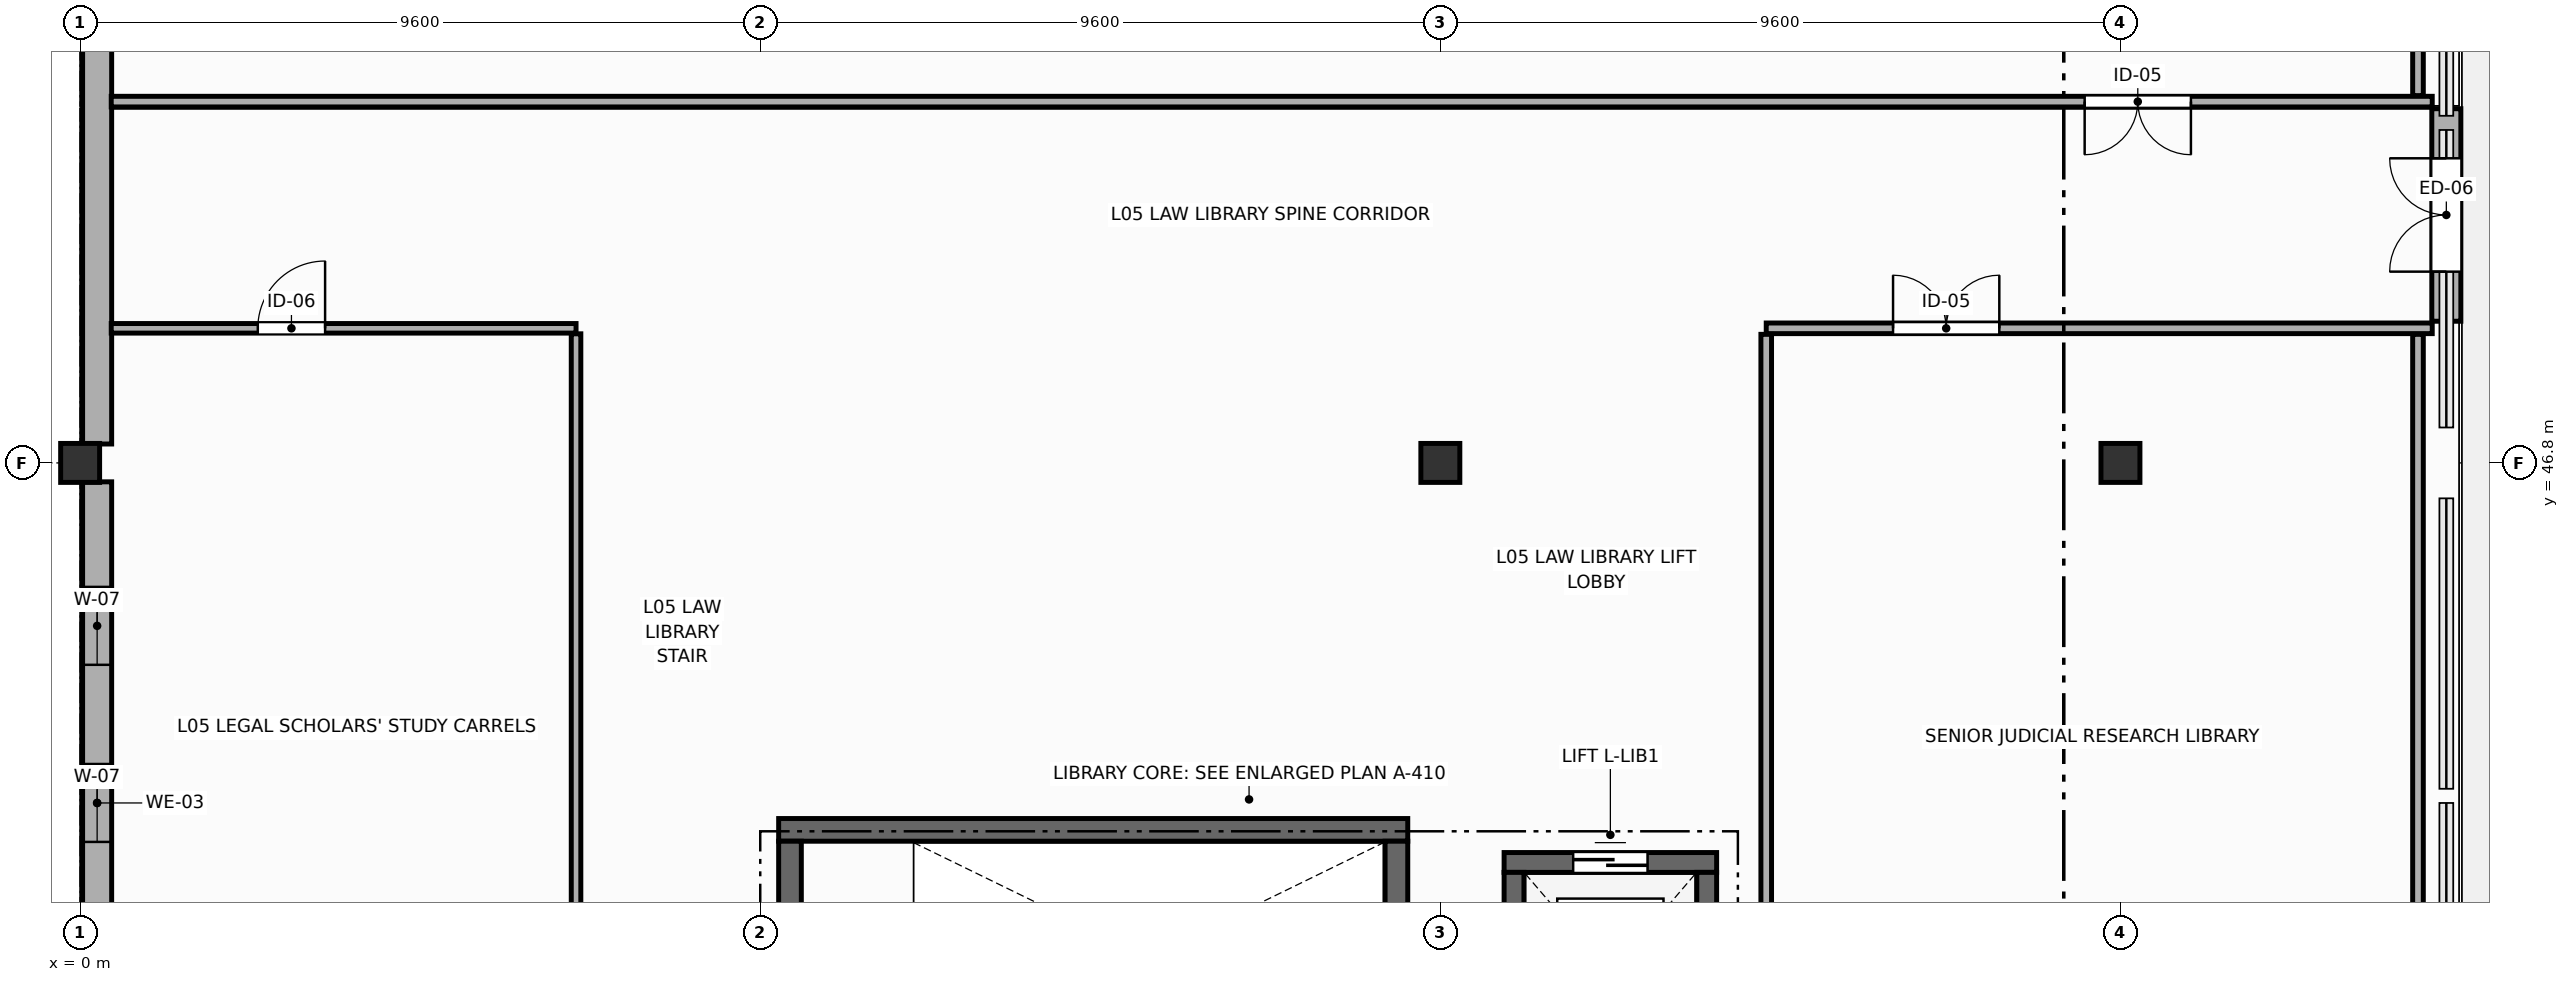
"""IFC4 building model, lengths in metres.
Left out: names, types, materials, properties, quantities, classifications, styles, units other than length and angle.
Written with IfcOpenShell. Run it as: python <this file> out.ifc"""

import sys

from ifc_helpers import new_model, si_unit, direction, frame, frame_2d, origin, origin_2d, place, context, subcontext, project, spatial, rectangle, extrude, element, fill, save


model = new_model("IFC4")
c1 = context("Model", 3, precision=1e-05, world=origin(), true_north=direction((0.0, 1.0)))
c2 = subcontext(c1, "Body", "Model", "MODEL_VIEW")
j1 = project(units=[si_unit("LENGTHUNIT", "METRE"), si_unit("PLANEANGLEUNIT", "RADIAN")], contexts=[c1])
p1 = place(None, origin())
s1 = spatial("IfcSite", under=j1, at=p1, CompositionType="ELEMENT")
p2 = place(p1, origin())
s2 = spatial("IfcBuilding", under=s1, at=p2, CompositionType="ELEMENT")
p3 = place(p2, frame((0.0, 0.0, 18.6)))
s3 = spatial("IfcBuildingStorey", under=s2, at=p3, CompositionType="ELEMENT", Elevation=18.6)
for number, where, z_axis, x_axis in (
    (1, (0.0, 46.8, 0.0), (0.0, 0.0, 1.0), (1.0, 0.0, 0.0)),
    (2, (19.2, 46.8, 0.0), (0.0, 0.0, 1.0), (1.0, 0.0, 0.0)),
    (3, (28.8, 46.8, 0.0), (0.0, 0.0, 1.0), (1.0, 0.0, 0.0)),
):
    element("IfcColumn", number, at=place(p3, frame(where, z_axis=z_axis, x_axis=x_axis)), inside=s3, PredefinedType="COLUMN", context=c2, shape_type="SweptSolid", body=[
        extrude(rectangle(XDim=0.55, YDim=0.55, at=origin_2d()), origin(), (0.0, 0.0, 1.0), 4.2),
    ])
p4 = place(p3, frame((0.24, 37.467, 0.0), z_axis=(0.0, 0.0, 1.0), x_axis=(0.0, 1.0, 0.0)))
e4 = element("IfcWall", 4, at=p4, inside=s3, PredefinedType="STANDARD", context=c2, shape_type="SweptSolid", body=[
    extrude(rectangle(XDim=9.066, YDim=0.41, at=frame_2d((4.533, 0.0))), origin(), (0.0, 0.0, 1.0), 3.14),
])
p5 = place(p4, frame((1.483, 0.0, 0.9)))
e5 = element("IfcOpeningElement", 5, at=p5, cuts=e4, PredefinedType="OPENING", context=c2, shape_type="SweptSolid", body=[
    extrude(rectangle(XDim=1.1, YDim=1.85, at=frame_2d((0.55, 0.925))), frame((0.0, 0.215, 0.0), z_axis=(0.0, -1.0, 0.0), x_axis=(1.0, 0.0, 0.0)), (0.0, 0.0, 1.0), 0.43),
])
p6 = place(p4, frame((3.983, 0.0, 0.9)))
e6 = element("IfcOpeningElement", 6, at=p6, cuts=e4, PredefinedType="OPENING", context=c2, shape_type="SweptSolid", body=[
    extrude(rectangle(XDim=1.1, YDim=1.85, at=frame_2d((0.55, 0.925))), frame((0.0, 0.215, 0.0), z_axis=(0.0, -1.0, 0.0), x_axis=(1.0, 0.0, 0.0)), (0.0, 0.0, 1.0), 0.43),
])
p7 = place(p4, frame((6.483, 0.0, 0.9)))
e7 = element("IfcOpeningElement", 7, at=p7, cuts=e4, PredefinedType="OPENING", context=c2, shape_type="SweptSolid", body=[
    extrude(rectangle(XDim=1.1, YDim=1.85, at=frame_2d((0.55, 0.925))), frame((0.0, 0.215, 0.0), z_axis=(0.0, -1.0, 0.0), x_axis=(1.0, 0.0, 0.0)), (0.0, 0.0, 1.0), 0.43),
])
p8 = place(p3, frame((0.24, 47.067, 0.0), z_axis=(0.0, 0.0, 1.0), x_axis=(0.0, 1.0, 0.0)))
e8 = element("IfcWall", 8, at=p8, inside=s3, PredefinedType="STANDARD", context=c2, shape_type="SweptSolid", body=[
    extrude(rectangle(XDim=9.066, YDim=0.41, at=frame_2d((4.533, 0.0))), origin(), (0.0, 0.0, 1.0), 3.14),
])
p9 = place(p8, frame((6.483, 0.0, 0.9)))
e9 = element("IfcOpeningElement", 9, at=p9, cuts=e8, PredefinedType="OPENING", context=c2, shape_type="SweptSolid", body=[
    extrude(rectangle(XDim=1.1, YDim=1.85, at=frame_2d((0.55, 0.925))), frame((0.0, 0.215, 0.0), z_axis=(0.0, -1.0, 0.0), x_axis=(1.0, 0.0, 0.0)), (0.0, 0.0, 1.0), 0.43),
])
p10 = place(p3, frame((33.4, 48.8, 0.0), z_axis=(0.0, 0.0, 1.0), x_axis=(0.0, 1.0, 0.0)))
e10 = element("IfcWall", 10, at=p10, inside=s3, PredefinedType="STANDARD", context=c2, shape_type="SweptSolid", body=[
    extrude(rectangle(XDim=3.0, YDim=0.41, at=frame_2d((1.5, 0.0))), origin(), (0.0, 0.0, 1.0), 3.96),
])
p11 = place(p10, frame((0.7, 0.0, 0.0)))
e11 = element("IfcOpeningElement", 11, at=p11, cuts=e10, PredefinedType="OPENING", context=c2, shape_type="SweptSolid", body=[
    extrude(rectangle(XDim=1.6, YDim=2.2, at=frame_2d((0.8, 1.1))), frame((0.0, 0.215, 0.0), z_axis=(0.0, -1.0, 0.0), x_axis=(1.0, 0.0, 0.0)), (0.0, 0.0, 1.0), 0.43),
])
p12 = place(p3, frame((9.86, 41.62, 0.0), z_axis=(0.0, 0.0, 1.0), x_axis=(1.0, 0.0, 0.0)))
e12 = element("IfcWall", 12, at=p12, inside=s3, PredefinedType="SHEAR", context=c2, shape_type="SweptSolid", body=[
    extrude(rectangle(XDim=8.88, YDim=0.32, at=frame_2d((4.44, 0.0))), origin(), (0.0, 0.0, 1.0), 3.96),
])
p13 = place(p3, frame((10.02, 38.18, 0.0), z_axis=(0.0, 0.0, 1.0), x_axis=(0.0, 1.0, 0.0)))
e13 = element("IfcWall", 13, at=p13, inside=s3, PredefinedType="SHEAR", context=c2, shape_type="SweptSolid", body=[
    extrude(rectangle(XDim=3.28, YDim=0.32, at=frame_2d((1.64, 0.0))), origin(), (0.0, 0.0, 1.0), 3.96),
])
p14 = place(p13, frame((1.065, 0.0, 0.0)))
e14 = element("IfcOpeningElement", 14, at=p14, cuts=e13, PredefinedType="OPENING", context=c2, shape_type="SweptSolid", body=[
    extrude(rectangle(XDim=1.15, YDim=2.2, at=frame_2d((0.575, 1.1))), frame((0.0, 0.17, 0.0), z_axis=(0.0, -1.0, 0.0), x_axis=(1.0, 0.0, 0.0)), (0.0, 0.0, 1.0), 0.34),
])
p15 = place(p3, frame((18.58, 41.46, 0.0), z_axis=(0.0, 0.0, 1.0), x_axis=(0.0, -1.0, 0.0)))
e15 = element("IfcWall", 15, at=p15, inside=s3, PredefinedType="SHEAR", context=c2, shape_type="SweptSolid", body=[
    extrude(rectangle(XDim=3.28, YDim=0.32, at=frame_2d((1.64, 0.0))), origin(), (0.0, 0.0, 1.0), 3.96),
])
p16 = place(p3, frame((20.1, 41.16, 0.0), z_axis=(0.0, 0.0, 1.0), x_axis=(1.0, 0.0, 0.0)))
e16 = element("IfcWall", 16, at=p16, inside=s3, PredefinedType="SHEAR", context=c2, shape_type="SweptSolid", body=[
    extrude(rectangle(XDim=3.0, YDim=0.28, at=frame_2d((1.5, 0.0))), origin(), (0.0, 0.0, 1.0), 3.96),
])
p17 = place(p16, frame((0.975, 0.0, 0.0)))
e17 = element("IfcOpeningElement", 17, at=p17, cuts=e16, PredefinedType="OPENING", context=c2, shape_type="SweptSolid", body=[
    extrude(rectangle(XDim=1.05, YDim=2.2, at=frame_2d((0.525, 1.1))), frame((0.0, 0.15, 0.0), z_axis=(0.0, -1.0, 0.0), x_axis=(1.0, 0.0, 0.0)), (0.0, 0.0, 1.0), 0.3),
])
for number, where, z_axis, x_axis in (
    (18, (20.24, 38.18, 0.0), (0.0, 0.0, 1.0), (0.0, 1.0, 0.0)),
    (19, (22.96, 41.02, 0.0), (0.0, 0.0, 1.0), (0.0, -1.0, 0.0)),
):
    element("IfcWall", number, at=place(p3, frame(where, z_axis=z_axis, x_axis=x_axis)), inside=s3, PredefinedType="SHEAR", context=c2, shape_type="SweptSolid", body=[
        extrude(rectangle(XDim=2.84, YDim=0.28, at=frame_2d((1.42, 0.0))), origin(), (0.0, 0.0, 1.0), 3.96),
    ])
p18 = place(p3, frame((33.201, 51.9, 0.0), z_axis=(0.0, 0.0, 1.0), x_axis=(-1.0, 0.0, 0.0)))
e20 = element("IfcWall", 20, at=p18, inside=s3, PredefinedType="PARTITIONING", context=c2, shape_type="SweptSolid", body=[
    extrude(rectangle(XDim=32.762, YDim=0.15, at=frame_2d((16.381, 0.0))), origin(), (0.0, 0.0, 1.0), 2.99),
])
p19 = place(p18, frame((3.406, 0.0, 0.0)))
e21 = element("IfcOpeningElement", 21, at=p19, cuts=e20, PredefinedType="OPENING", context=c2, shape_type="SweptSolid", body=[
    extrude(rectangle(XDim=1.5, YDim=2.35, at=frame_2d((0.75, 1.175))), frame((0.0, 0.085, 0.0), z_axis=(0.0, -1.0, 0.0), x_axis=(1.0, 0.0, 0.0)), (0.0, 0.0, 1.0), 0.17),
])
p20 = place(p3, frame((33.0, 66.761, 0.0), z_axis=(0.0, 0.0, 1.0), x_axis=(0.0, -1.0, 0.0)))
e22 = element("IfcWall", 22, at=p20, inside=s3, PredefinedType="PARTITIONING", context=c2, shape_type="SweptSolid", body=[
    extrude(rectangle(XDim=14.776, YDim=0.15, at=frame_2d((7.388, 0.0))), origin(), (0.0, 0.0, 1.0), 3.26),
])
p21 = place(p3, frame((0.439, 48.7, 0.0), z_axis=(0.0, 0.0, 1.0), x_axis=(1.0, 0.0, 0.0)))
e23 = element("IfcWall", 23, at=p21, inside=s3, PredefinedType="PARTITIONING", context=c2, shape_type="SweptSolid", body=[
    extrude(rectangle(XDim=6.561, YDim=0.135, at=frame_2d((3.281, 0.0))), origin(), (0.0, 0.0, 1.0), 3.14),
])
p22 = place(p21, frame((2.069, 0.0, 0.0)))
e24 = element("IfcOpeningElement", 24, at=p22, cuts=e23, PredefinedType="OPENING", context=c2, shape_type="SweptSolid", body=[
    extrude(rectangle(XDim=0.95, YDim=2.15, at=frame_2d((0.475, 1.075))), frame((0.0, 0.077, 0.0), z_axis=(0.0, -1.0, 0.0), x_axis=(1.0, 0.0, 0.0)), (0.0, 0.0, 1.0), 0.155),
])
p23 = place(p3, frame((7.0, 48.623, 0.0), z_axis=(0.0, 0.0, 1.0), x_axis=(0.0, -1.0, 0.0)))
e25 = element("IfcWall", 25, at=p23, inside=s3, PredefinedType="PARTITIONING", context=c2, shape_type="SweptSolid", body=[
    extrude(rectangle(XDim=10.974, YDim=0.135, at=frame_2d((5.487, 0.0))), origin(), (0.0, 0.0, 1.0), 3.945),
])
p24 = place(p3, frame((23.8, 48.7, 0.0), z_axis=(0.0, 0.0, 1.0), x_axis=(1.0, 0.0, 0.0)))
e26 = element("IfcWall", 26, at=p24, inside=s3, PredefinedType="PARTITIONING", context=c2, shape_type="SweptSolid", body=[
    extrude(rectangle(XDim=9.401, YDim=0.15, at=frame_2d((4.7, 0.0))), origin(), (0.0, 0.0, 1.0), 3.14),
])
p25 = place(p24, frame((1.79, 0.0, 0.0)))
e27 = element("IfcOpeningElement", 27, at=p25, cuts=e26, PredefinedType="OPENING", context=c2, shape_type="SweptSolid", body=[
    extrude(rectangle(XDim=1.5, YDim=2.35, at=frame_2d((0.75, 1.175))), frame((0.0, 0.085, 0.0), z_axis=(0.0, -1.0, 0.0), x_axis=(1.0, 0.0, 0.0)), (0.0, 0.0, 1.0), 0.17),
])
p26 = place(p3, frame((23.8, 37.649, 0.0), z_axis=(0.0, 0.0, 1.0), x_axis=(0.0, 1.0, 0.0)))
e28 = element("IfcWall", 28, at=p26, inside=s3, PredefinedType="PARTITIONING", context=c2, shape_type="SweptSolid", body=[
    extrude(rectangle(XDim=10.966, YDim=0.15, at=frame_2d((5.483, 0.0))), origin(), (0.0, 0.0, 1.0), 3.29),
])
p27 = place(p3, frame((33.0, 48.615, 0.0), z_axis=(0.0, 0.0, 1.0), x_axis=(0.0, -1.0, 0.0)))
e29 = element("IfcWall", 29, at=p27, inside=s3, PredefinedType="PARTITIONING", context=c2, shape_type="SweptSolid", body=[
    extrude(rectangle(XDim=10.966, YDim=0.15, at=frame_2d((5.483, 0.0))), origin(), (0.0, 0.0, 1.0), 3.945),
])
p28 = place(p6, origin())
e30 = element("IfcWindow", 30, at=p28, inside=s3, PartitioningType="SINGLE_PANEL", PredefinedType="WINDOW", context=c2, shape_type="SweptSolid", body=[
    extrude(rectangle(XDim=1.1, YDim=1.85, at=frame_2d((0.55, 0.925))), frame((0.0, 0.03, 0.0), z_axis=(0.0, -1.0, 0.0), x_axis=(1.0, 0.0, 0.0)), (0.0, 0.0, 1.0), 0.06),
])
fill(e6, e30)
p29 = place(p7, origin())
e31 = element("IfcWindow", 31, at=p29, inside=s3, PartitioningType="SINGLE_PANEL", PredefinedType="WINDOW", context=c2, shape_type="SweptSolid", body=[
    extrude(rectangle(XDim=1.1, YDim=1.85, at=frame_2d((0.55, 0.925))), frame((0.0, 0.03, 0.0), z_axis=(0.0, -1.0, 0.0), x_axis=(1.0, 0.0, 0.0)), (0.0, 0.0, 1.0), 0.06),
])
fill(e7, e31)
p30 = place(p11, origin())
e32 = element("IfcDoor", 32, at=p30, inside=s3, OperationType="DOUBLE_DOOR_SINGLE_SWING", PredefinedType="DOOR", context=c2, shape_type="SweptSolid", body=[
    extrude(rectangle(XDim=1.6, YDim=2.2, at=frame_2d((0.8, 1.1))), frame((0.0, 0.025, 0.0), z_axis=(0.0, -1.0, 0.0), x_axis=(1.0, 0.0, 0.0)), (0.0, 0.0, 1.0), 0.05),
])
fill(e11, e32)
p31 = place(p17, origin())
e33 = element("IfcDoor", 33, at=p31, inside=s3, OperationType="DOUBLE_DOOR_SLIDING", PredefinedType="DOOR", context=c2, shape_type="SweptSolid", body=[
    extrude(rectangle(XDim=1.05, YDim=2.2, at=frame_2d((0.525, 1.1))), frame((0.0, 0.025, 0.0), z_axis=(0.0, -1.0, 0.0), x_axis=(1.0, 0.0, 0.0)), (0.0, 0.0, 1.0), 0.05),
])
fill(e17, e33)
p32 = place(p19, origin())
e34 = element("IfcDoor", 34, at=p32, inside=s3, OperationType="DOUBLE_DOOR_SINGLE_SWING", PredefinedType="DOOR", context=c2, shape_type="SweptSolid", body=[
    extrude(rectangle(XDim=1.5, YDim=2.35, at=frame_2d((0.75, 1.175))), frame((0.0, 0.025, 0.0), z_axis=(0.0, -1.0, 0.0), x_axis=(1.0, 0.0, 0.0)), (0.0, 0.0, 1.0), 0.05),
])
fill(e21, e34)
p33 = place(p22, origin())
e35 = element("IfcDoor", 35, at=p33, inside=s3, OperationType="SINGLE_SWING_RIGHT", PredefinedType="DOOR", context=c2, shape_type="SweptSolid", body=[
    extrude(rectangle(XDim=0.95, YDim=2.15, at=frame_2d((0.475, 1.075))), frame((0.0, 0.025, 0.0), z_axis=(0.0, -1.0, 0.0), x_axis=(1.0, 0.0, 0.0)), (0.0, 0.0, 1.0), 0.05),
])
fill(e24, e35)
p34 = place(p25, origin())
e36 = element("IfcDoor", 36, at=p34, inside=s3, OperationType="DOUBLE_DOOR_SINGLE_SWING", PredefinedType="DOOR", context=c2, shape_type="SweptSolid", body=[
    extrude(rectangle(XDim=1.5, YDim=2.35, at=frame_2d((0.75, 1.175))), frame((0.0, 0.025, 0.0), z_axis=(0.0, -1.0, 0.0), x_axis=(1.0, 0.0, 0.0)), (0.0, 0.0, 1.0), 0.05),
])
fill(e27, e36)
save(model, sys.argv[1])
